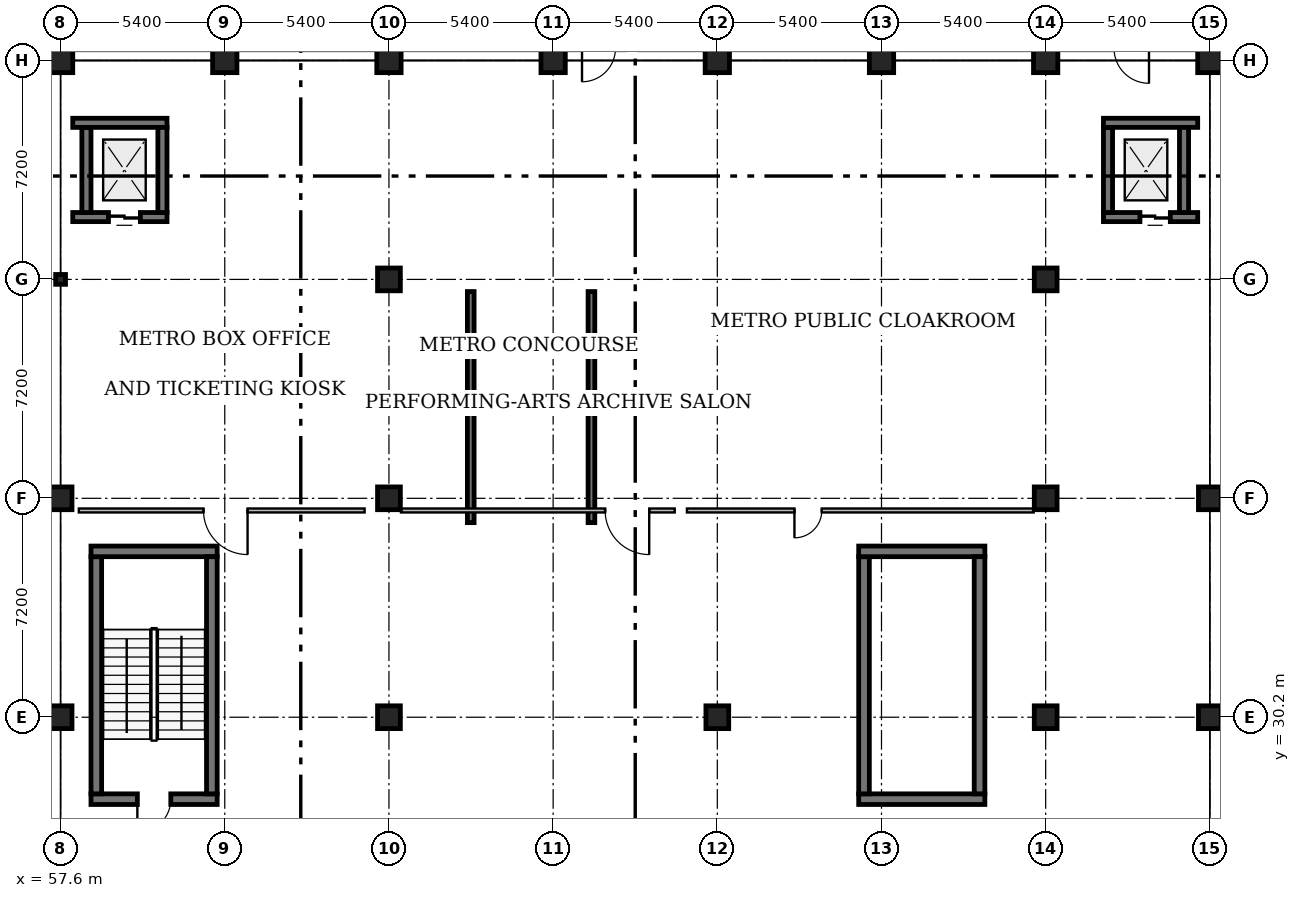
"""IFC4 building model, lengths in metres.
Left out: names, types, materials, properties, quantities, classifications, styles, units other than length and angle.
Written with IfcOpenShell. Run it as: python <this file> out.ifc"""

import sys

from ifc_helpers import new_model, si_unit, direction, frame, frame_2d, origin, origin_2d, place, context, subcontext, project, spatial, rectangle, circle, hollow_circle, extrude, element, fill, save


model = new_model("IFC4")
c1 = context("Model", 3, precision=1e-05, world=origin(), true_north=direction((0.0, 1.0)))
c2 = subcontext(c1, "Body", "Model", "MODEL_VIEW")
j1 = project(units=[si_unit("LENGTHUNIT", "METRE"), si_unit("PLANEANGLEUNIT", "RADIAN")], contexts=[c1])
p1 = place(None, origin())
s1 = spatial("IfcSite", under=j1, at=p1, CompositionType="ELEMENT")
p2 = place(p1, origin())
s2 = spatial("IfcBuilding", under=s1, at=p2, CompositionType="ELEMENT")
p3 = place(p2, frame((0.0, 0.0, -4.8)))
s3 = spatial("IfcBuildingStorey", under=s2, at=p3, CompositionType="ELEMENT", Elevation=-4.8)
for number, where, z_axis, x_axis in (
    (1, (68.4, 30.2, 0.0), (0.0, 0.0, 1.0), (1.0, 0.0, 0.0)),
    (2, (68.4, 37.4, 0.0), (0.0, 0.0, 1.0), (1.0, 0.0, 0.0)),
    (3, (68.4, 44.6, 0.0), (0.0, 0.0, 1.0), (1.0, 0.0, 0.0)),
):
    element("IfcColumn", number, at=place(p3, frame(where, z_axis=z_axis, x_axis=x_axis)), inside=s3, PredefinedType="COLUMN", context=c2, shape_type="SweptSolid", body=[
        extrude(circle(Radius=0.375, at=origin_2d()), origin(), (0.0, 0.0, 1.0), 4.8),
    ])
for number, where, z_axis, x_axis in (
    (4, (68.4, 51.8, 0.0), (0.0, 0.0, 1.0), (1.0, 0.0, 0.0)),
    (5, (73.8, 51.8, 0.0), (0.0, 0.0, 1.0), (1.0, 0.0, 0.0)),
):
    element("IfcColumn", number, at=place(p3, frame(where, z_axis=z_axis, x_axis=x_axis)), inside=s3, PredefinedType="COLUMN", context=c2, shape_type="SweptSolid", body=[
        extrude(rectangle(XDim=0.8, YDim=0.8, at=origin_2d()), origin(), (0.0, 0.0, 1.0), 4.8),
    ])
p4 = place(p3, frame((79.2, 30.2, 0.0), z_axis=(0.0, 0.0, 1.0), x_axis=(1.0, 0.0, 0.0)))
e6 = element("IfcColumn", 6, at=p4, inside=s3, PredefinedType="COLUMN", context=c2, shape_type="SweptSolid", body=[
    extrude(circle(Radius=0.375, at=origin_2d()), origin(), (0.0, 0.0, 1.0), 4.8),
])
for number, where, z_axis, x_axis in (
    (7, (79.2, 51.8, 0.0), (0.0, 0.0, 1.0), (1.0, 0.0, 0.0)),
    (8, (84.6, 51.8, 0.0), (0.0, 0.0, 1.0), (1.0, 0.0, 0.0)),
):
    element("IfcColumn", number, at=place(p3, frame(where, z_axis=z_axis, x_axis=x_axis)), inside=s3, PredefinedType="COLUMN", context=c2, shape_type="SweptSolid", body=[
        extrude(rectangle(XDim=0.8, YDim=0.8, at=origin_2d()), origin(), (0.0, 0.0, 1.0), 4.8),
    ])
for number, where, z_axis, x_axis in (
    (9, (90.0, 30.2, 0.0), (0.0, 0.0, 1.0), (1.0, 0.0, 0.0)),
    (10, (90.0, 37.4, 0.0), (0.0, 0.0, 1.0), (1.0, 0.0, 0.0)),
    (11, (90.0, 44.6, 0.0), (0.0, 0.0, 1.0), (1.0, 0.0, 0.0)),
):
    element("IfcColumn", number, at=place(p3, frame(where, z_axis=z_axis, x_axis=x_axis)), inside=s3, PredefinedType="COLUMN", context=c2, shape_type="SweptSolid", body=[
        extrude(circle(Radius=0.375, at=origin_2d()), origin(), (0.0, 0.0, 1.0), 4.8),
    ])
p5 = place(p3, frame((90.0, 51.8, 0.0), z_axis=(0.0, 0.0, 1.0), x_axis=(1.0, 0.0, 0.0)))
e12 = element("IfcColumn", 12, at=p5, inside=s3, PredefinedType="COLUMN", context=c2, shape_type="SweptSolid", body=[
    extrude(rectangle(XDim=0.8, YDim=0.8, at=origin_2d()), origin(), (0.0, 0.0, 1.0), 4.8),
])
for number, where, z_axis, x_axis in (
    (13, (95.4, 30.2, 0.0), (0.0, 0.0, 1.0), (1.0, 0.0, 0.0)),
    (14, (95.4, 37.4, 0.0), (0.0, 0.0, 1.0), (1.0, 0.0, 0.0)),
):
    element("IfcColumn", number, at=place(p3, frame(where, z_axis=z_axis, x_axis=x_axis)), inside=s3, PredefinedType="COLUMN", context=c2, shape_type="SweptSolid", body=[
        extrude(circle(Radius=0.375, at=origin_2d()), origin(), (0.0, 0.0, 1.0), 4.8),
    ])
p6 = place(p3, frame((95.4, 51.8, 0.0), z_axis=(0.0, 0.0, 1.0), x_axis=(1.0, 0.0, 0.0)))
e15 = element("IfcColumn", 15, at=p6, inside=s3, PredefinedType="COLUMN", context=c2, shape_type="SweptSolid", body=[
    extrude(rectangle(XDim=0.8, YDim=0.8, at=origin_2d()), origin(), (0.0, 0.0, 1.0), 4.8),
])
for number, where, z_axis, x_axis in (
    (16, (57.6, 30.2, 0.0), (0.0, 0.0, 1.0), (1.0, 0.0, 0.0)),
    (17, (57.6, 37.4, 0.0), (0.0, 0.0, 1.0), (1.0, 0.0, 0.0)),
):
    element("IfcColumn", number, at=place(p3, frame(where, z_axis=z_axis, x_axis=x_axis)), inside=s3, PredefinedType="COLUMN", context=c2, shape_type="SweptSolid", body=[
        extrude(circle(Radius=0.375, at=origin_2d()), origin(), (0.0, 0.0, 1.0), 4.8),
    ])
p7 = place(p3, frame((57.6, 44.6, 0.0), z_axis=(0.0, 0.0, 1.0), x_axis=(1.0, 0.0, 0.0)))
e18 = element("IfcColumn", 18, at=p7, inside=s3, PredefinedType="COLUMN", context=c2, shape_type="SweptSolid", body=[
    extrude(hollow_circle(Radius=0.162, WallThickness=0.012, at=origin_2d()), origin(), (0.0, 0.0, 1.0), 4.8),
])
for number, where, z_axis, x_axis in (
    (19, (57.6, 51.8, 0.0), (0.0, 0.0, 1.0), (1.0, 0.0, 0.0)),
    (20, (63.0, 51.8, 0.0), (0.0, 0.0, 1.0), (1.0, 0.0, 0.0)),
):
    element("IfcColumn", number, at=place(p3, frame(where, z_axis=z_axis, x_axis=x_axis)), inside=s3, PredefinedType="COLUMN", context=c2, shape_type="SweptSolid", body=[
        extrude(rectangle(XDim=0.8, YDim=0.8, at=origin_2d()), origin(), (0.0, 0.0, 1.0), 4.8),
    ])
p8 = place(p3, frame((61.1, 46.65, 0.0), z_axis=(0.0, 0.0, 1.0), x_axis=(-1.0, 0.0, 0.0)))
e21 = element("IfcWall", 21, at=p8, inside=s3, PredefinedType="SOLIDWALL", context=c2, shape_type="SweptSolid", body=[
    extrude(rectangle(XDim=3.1, YDim=0.3, at=frame_2d((1.55, 0.0))), origin(), (0.0, 0.0, 1.0), 4.8),
])
p9 = place(p8, frame((0.875, 0.0, 0.0)))
e22 = element("IfcOpeningElement", 22, at=p9, cuts=e21, PredefinedType="OPENING", context=c2, shape_type="SweptSolid", body=[
    extrude(rectangle(XDim=1.05, YDim=2.1, at=frame_2d((0.525, 1.05))), frame((0.0, 0.17, 0.0), z_axis=(0.0, -1.0, 0.0), x_axis=(1.0, 0.0, 0.0)), (0.0, 0.0, 1.0), 0.34),
])
p10 = place(p3, frame((58.45, 46.8, 0.0), z_axis=(0.0, 0.0, 1.0), x_axis=(0.0, 1.0, 0.0)))
e23 = element("IfcWall", 23, at=p10, inside=s3, PredefinedType="SOLIDWALL", context=c2, shape_type="SweptSolid", body=[
    extrude(rectangle(XDim=2.8, YDim=0.3, at=frame_2d((1.4, 0.0))), origin(), (0.0, 0.0, 1.0), 4.8),
])
p11 = place(p3, frame((58.0, 49.75, 0.0), z_axis=(0.0, 0.0, 1.0), x_axis=(1.0, 0.0, 0.0)))
e24 = element("IfcWall", 24, at=p11, inside=s3, PredefinedType="SOLIDWALL", context=c2, shape_type="SweptSolid", body=[
    extrude(rectangle(XDim=3.1, YDim=0.3, at=frame_2d((1.55, 0.0))), origin(), (0.0, 0.0, 1.0), 4.8),
])
p12 = place(p3, frame((60.95, 49.6, 0.0), z_axis=(0.0, 0.0, 1.0), x_axis=(0.0, -1.0, 0.0)))
e25 = element("IfcWall", 25, at=p12, inside=s3, PredefinedType="SOLIDWALL", context=c2, shape_type="SweptSolid", body=[
    extrude(rectangle(XDim=2.8, YDim=0.3, at=frame_2d((1.4, 0.0))), origin(), (0.0, 0.0, 1.0), 4.8),
])
p13 = place(p3, frame((95.0, 46.65, 0.0), z_axis=(0.0, 0.0, 1.0), x_axis=(-1.0, 0.0, 0.0)))
e26 = element("IfcWall", 26, at=p13, inside=s3, PredefinedType="SOLIDWALL", context=c2, shape_type="SweptSolid", body=[
    extrude(rectangle(XDim=3.1, YDim=0.3, at=frame_2d((1.55, 0.0))), origin(), (0.0, 0.0, 1.0), 4.8),
])
p14 = place(p13, frame((0.9, 0.0, 0.0)))
e27 = element("IfcOpeningElement", 27, at=p14, cuts=e26, PredefinedType="OPENING", context=c2, shape_type="SweptSolid", body=[
    extrude(rectangle(XDim=1.0, YDim=2.1, at=frame_2d((0.5, 1.05))), frame((0.0, 0.17, 0.0), z_axis=(0.0, -1.0, 0.0), x_axis=(1.0, 0.0, 0.0)), (0.0, 0.0, 1.0), 0.34),
])
p15 = place(p3, frame((92.05, 46.8, 0.0), z_axis=(0.0, 0.0, 1.0), x_axis=(0.0, 1.0, 0.0)))
e28 = element("IfcWall", 28, at=p15, inside=s3, PredefinedType="SOLIDWALL", context=c2, shape_type="SweptSolid", body=[
    extrude(rectangle(XDim=2.8, YDim=0.3, at=frame_2d((1.4, 0.0))), origin(), (0.0, 0.0, 1.0), 4.8),
])
p16 = place(p3, frame((91.9, 49.75, 0.0), z_axis=(0.0, 0.0, 1.0), x_axis=(1.0, 0.0, 0.0)))
e29 = element("IfcWall", 29, at=p16, inside=s3, PredefinedType="SOLIDWALL", context=c2, shape_type="SweptSolid", body=[
    extrude(rectangle(XDim=3.1, YDim=0.3, at=frame_2d((1.55, 0.0))), origin(), (0.0, 0.0, 1.0), 4.8),
])
p17 = place(p3, frame((94.55, 49.6, 0.0), z_axis=(0.0, 0.0, 1.0), x_axis=(0.0, -1.0, 0.0)))
e30 = element("IfcWall", 30, at=p17, inside=s3, PredefinedType="SOLIDWALL", context=c2, shape_type="SweptSolid", body=[
    extrude(rectangle(XDim=2.8, YDim=0.3, at=frame_2d((1.4, 0.0))), origin(), (0.0, 0.0, 1.0), 4.8),
])
p18 = place(p3, frame((88.0, 27.505, 0.0), z_axis=(0.0, 0.0, 1.0), x_axis=(-1.0, 0.0, 0.0)))
e31 = element("IfcWall", 31, at=p18, inside=s3, PredefinedType="SOLIDWALL", context=c2, shape_type="SweptSolid", body=[
    extrude(rectangle(XDim=4.15, YDim=0.35, at=frame_2d((2.075, 0.0))), origin(), (0.0, 0.0, 1.0), 4.54),
])
p19 = place(p3, frame((84.025, 27.68, 0.0), z_axis=(0.0, 0.0, 1.0), x_axis=(0.0, 1.0, 0.0)))
e32 = element("IfcWall", 32, at=p19, inside=s3, PredefinedType="SOLIDWALL", context=c2, shape_type="SweptSolid", body=[
    extrude(rectangle(XDim=7.8, YDim=0.35, at=frame_2d((3.9, 0.0))), origin(), (0.0, 0.0, 1.0), 4.54),
])
p20 = place(p3, frame((83.85, 35.655, 0.0), z_axis=(0.0, 0.0, 1.0), x_axis=(1.0, 0.0, 0.0)))
e33 = element("IfcWall", 33, at=p20, inside=s3, PredefinedType="SOLIDWALL", context=c2, shape_type="SweptSolid", body=[
    extrude(rectangle(XDim=4.15, YDim=0.35, at=frame_2d((2.075, 0.0))), origin(), (0.0, 0.0, 1.0), 4.54),
])
p21 = place(p3, frame((87.825, 35.48, 0.0), z_axis=(0.0, 0.0, 1.0), x_axis=(0.0, -1.0, 0.0)))
e34 = element("IfcWall", 34, at=p21, inside=s3, PredefinedType="SOLIDWALL", context=c2, shape_type="SweptSolid", body=[
    extrude(rectangle(XDim=7.8, YDim=0.35, at=frame_2d((3.9, 0.0))), origin(), (0.0, 0.0, 1.0), 4.54),
])
p22 = place(p3, frame((62.75, 27.505, 0.0), z_axis=(0.0, 0.0, 1.0), x_axis=(-1.0, 0.0, 0.0)))
e35 = element("IfcWall", 35, at=p22, inside=s3, PredefinedType="SOLIDWALL", context=c2, shape_type="SweptSolid", body=[
    extrude(rectangle(XDim=4.15, YDim=0.35, at=frame_2d((2.075, 0.0))), origin(), (0.0, 0.0, 1.0), 4.56),
])
p23 = place(p22, frame((1.525, 0.0, 0.0)))
e36 = element("IfcOpeningElement", 36, at=p23, cuts=e35, PredefinedType="OPENING", context=c2, shape_type="SweptSolid", body=[
    extrude(rectangle(XDim=1.1, YDim=2.15, at=frame_2d((0.55, 1.075))), frame((0.0, 0.195, 0.0), z_axis=(0.0, -1.0, 0.0), x_axis=(1.0, 0.0, 0.0)), (0.0, 0.0, 1.0), 0.39),
])
p24 = place(p3, frame((58.775, 27.68, 0.0), z_axis=(0.0, 0.0, 1.0), x_axis=(0.0, 1.0, 0.0)))
e37 = element("IfcWall", 37, at=p24, inside=s3, PredefinedType="SOLIDWALL", context=c2, shape_type="SweptSolid", body=[
    extrude(rectangle(XDim=7.8, YDim=0.35, at=frame_2d((3.9, 0.0))), origin(), (0.0, 0.0, 1.0), 4.56),
])
p25 = place(p3, frame((58.6, 35.655, 0.0), z_axis=(0.0, 0.0, 1.0), x_axis=(1.0, 0.0, 0.0)))
e38 = element("IfcWall", 38, at=p25, inside=s3, PredefinedType="SOLIDWALL", context=c2, shape_type="SweptSolid", body=[
    extrude(rectangle(XDim=4.15, YDim=0.35, at=frame_2d((2.075, 0.0))), origin(), (0.0, 0.0, 1.0), 4.56),
])
p26 = place(p3, frame((62.575, 35.48, 0.0), z_axis=(0.0, 0.0, 1.0), x_axis=(0.0, -1.0, 0.0)))
e39 = element("IfcWall", 39, at=p26, inside=s3, PredefinedType="SOLIDWALL", context=c2, shape_type="SweptSolid", body=[
    extrude(rectangle(XDim=7.8, YDim=0.35, at=frame_2d((3.9, 0.0))), origin(), (0.0, 0.0, 1.0), 4.56),
])
for number, where, z_axis, x_axis in (
    (40, (71.09, 36.6, 0.0), (0.0, 0.0, 1.0), (0.0, 1.0, 0.0)),
    (41, (75.06, 36.6, 0.0), (0.0, 0.0, 1.0), (0.0, 1.0, 0.0)),
):
    element("IfcWall", number, at=place(p3, frame(where, z_axis=z_axis, x_axis=x_axis)), inside=s3, PredefinedType="SOLIDWALL", context=c2, shape_type="SweptSolid", body=[
        extrude(rectangle(XDim=7.6, YDim=0.22, at=frame_2d((3.8, 0.0))), origin(), (0.0, 0.0, 1.0), 4.52),
    ])
p27 = place(p3, frame((67.6, 37.0, 0.0), z_axis=(0.0, 0.0, 1.0), x_axis=(-1.0, 0.0, 0.0)))
e42 = element("IfcWall", 42, at=p27, inside=s3, PredefinedType="PARTITIONING", context=c2, shape_type="SweptSolid", body=[
    extrude(rectangle(XDim=9.4, YDim=0.13, at=frame_2d((4.7, 0.0))), origin(), (0.0, 0.0, 1.0), 3.51),
])
p28 = place(p27, frame((3.85, 0.0, 0.0)))
e43 = element("IfcOpeningElement", 43, at=p28, cuts=e42, PredefinedType="OPENING", context=c2, shape_type="SweptSolid", body=[
    extrude(rectangle(XDim=1.45, YDim=2.2, at=frame_2d((0.725, 1.1))), frame((0.0, 0.085, 0.0), z_axis=(0.0, -1.0, 0.0), x_axis=(1.0, 0.0, 0.0)), (0.0, 0.0, 1.0), 0.17),
])
p29 = place(p3, frame((89.605, 37.0, 0.0), z_axis=(0.0, 0.0, 1.0), x_axis=(-1.0, 0.0, 0.0)))
e44 = element("IfcWall", 44, at=p29, inside=s3, PredefinedType="PARTITIONING", context=c2, shape_type="SweptSolid", body=[
    extrude(rectangle(XDim=11.405, YDim=0.13, at=frame_2d((5.703, 0.0))), origin(), (0.0, 0.0, 1.0), 4.54),
])
p30 = place(p29, frame((6.969, 0.0, 0.0)))
e45 = element("IfcOpeningElement", 45, at=p30, cuts=e44, PredefinedType="OPENING", context=c2, shape_type="SweptSolid", body=[
    extrude(rectangle(XDim=0.9, YDim=2.15, at=frame_2d((0.45, 1.075))), frame((0.0, 0.085, 0.0), z_axis=(0.0, -1.0, 0.0), x_axis=(1.0, 0.0, 0.0)), (0.0, 0.0, 1.0), 0.17),
])
p31 = place(p3, frame((77.8, 37.0, 0.0), z_axis=(0.0, 0.0, 1.0), x_axis=(-1.0, 0.0, 0.0)))
e46 = element("IfcWall", 46, at=p31, inside=s3, PredefinedType="PARTITIONING", context=c2, shape_type="SweptSolid", body=[
    extrude(rectangle(XDim=9.005, YDim=0.13, at=frame_2d((4.502, 0.0))), origin(), (0.0, 0.0, 1.0), 4.54),
])
p32 = place(p31, frame((0.84, 0.0, 0.0)))
e47 = element("IfcOpeningElement", 47, at=p32, cuts=e46, PredefinedType="OPENING", context=c2, shape_type="SweptSolid", body=[
    extrude(rectangle(XDim=1.45, YDim=2.2, at=frame_2d((0.725, 1.1))), frame((0.0, 0.085, 0.0), z_axis=(0.0, -1.0, 0.0), x_axis=(1.0, 0.0, 0.0)), (0.0, 0.0, 1.0), 0.17),
])
p33 = place(p9, origin())
e48 = element("IfcDoor", 48, at=p33, inside=s3, OperationType="DOUBLE_DOOR_SLIDING", PredefinedType="DOOR", context=c2, shape_type="SweptSolid", body=[
    extrude(rectangle(XDim=1.05, YDim=2.1, at=frame_2d((0.525, 1.05))), frame((0.0, 0.025, 0.0), z_axis=(0.0, -1.0, 0.0), x_axis=(1.0, 0.0, 0.0)), (0.0, 0.0, 1.0), 0.05),
])
fill(e22, e48)
p34 = place(p14, origin())
e49 = element("IfcDoor", 49, at=p34, inside=s3, OperationType="DOUBLE_DOOR_SLIDING", PredefinedType="DOOR", context=c2, shape_type="SweptSolid", body=[
    extrude(rectangle(XDim=1.0, YDim=2.1, at=frame_2d((0.5, 1.05))), frame((0.0, 0.025, 0.0), z_axis=(0.0, -1.0, 0.0), x_axis=(1.0, 0.0, 0.0)), (0.0, 0.0, 1.0), 0.05),
])
fill(e27, e49)
p35 = place(p23, origin())
e50 = element("IfcDoor", 50, at=p35, inside=s3, OperationType="SINGLE_SWING_RIGHT", PredefinedType="DOOR", context=c2, shape_type="SweptSolid", body=[
    extrude(rectangle(XDim=1.1, YDim=2.15, at=frame_2d((0.55, 1.075))), frame((0.0, 0.025, 0.0), z_axis=(0.0, -1.0, 0.0), x_axis=(1.0, 0.0, 0.0)), (0.0, 0.0, 1.0), 0.05),
])
fill(e36, e50)
p36 = place(p28, origin())
e51 = element("IfcDoor", 51, at=p36, inside=s3, OperationType="DOUBLE_DOOR_SINGLE_SWING", PredefinedType="DOOR", context=c2, shape_type="SweptSolid", body=[
    extrude(rectangle(XDim=1.45, YDim=2.2, at=frame_2d((0.725, 1.1))), frame((0.0, 0.025, 0.0), z_axis=(0.0, -1.0, 0.0), x_axis=(1.0, 0.0, 0.0)), (0.0, 0.0, 1.0), 0.05),
])
fill(e43, e51)
p37 = place(p30, origin())
e52 = element("IfcDoor", 52, at=p37, inside=s3, OperationType="SINGLE_SWING_RIGHT", PredefinedType="DOOR", context=c2, shape_type="SweptSolid", body=[
    extrude(rectangle(XDim=0.9, YDim=2.15, at=frame_2d((0.45, 1.075))), frame((0.0, 0.025, 0.0), z_axis=(0.0, -1.0, 0.0), x_axis=(1.0, 0.0, 0.0)), (0.0, 0.0, 1.0), 0.05),
])
fill(e45, e52)
p38 = place(p32, origin())
e53 = element("IfcDoor", 53, at=p38, inside=s3, OperationType="DOUBLE_DOOR_SINGLE_SWING", PredefinedType="DOOR", context=c2, shape_type="SweptSolid", body=[
    extrude(rectangle(XDim=1.45, YDim=2.2, at=frame_2d((0.725, 1.1))), frame((0.0, 0.025, 0.0), z_axis=(0.0, -1.0, 0.0), x_axis=(1.0, 0.0, 0.0)), (0.0, 0.0, 1.0), 0.05),
])
fill(e47, e53)
save(model, sys.argv[1])
